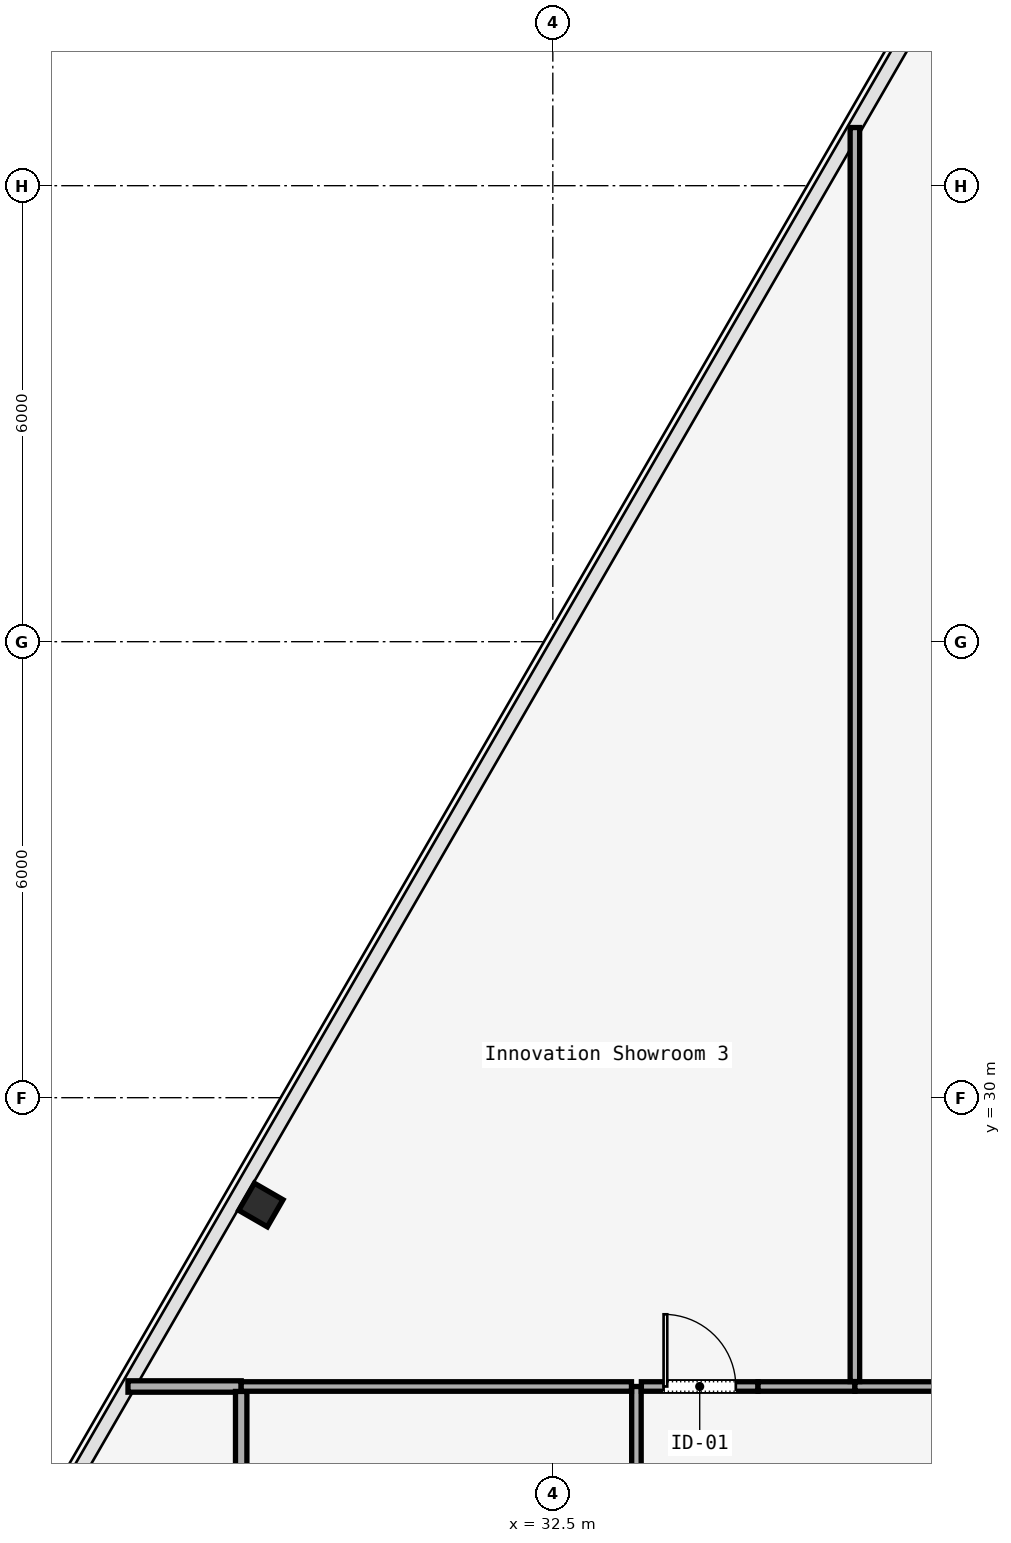
"""IFC4 building model, lengths in metres.
Left out: names, types, materials, properties, quantities, classifications, styles, units other than length and angle.
Written with IfcOpenShell. Run it as: python <this file> out.ifc"""

import sys

from ifc_helpers import new_model, si_unit, direction, frame, frame_2d, origin, origin_2d, place, context, subcontext, project, spatial, rectangle, i_section, extrude, element, fill, save


model = new_model("IFC4")
c1 = context("Model", 3, precision=1e-05, world=origin(), true_north=direction((0.0, 1.0)))
c2 = subcontext(c1, "Body", "Model", "MODEL_VIEW")
j1 = project(units=[si_unit("LENGTHUNIT", "METRE"), si_unit("PLANEANGLEUNIT", "RADIAN")], contexts=[c1])
p1 = place(None, origin())
s1 = spatial("IfcSite", under=j1, at=p1, CompositionType="ELEMENT")
p2 = place(p1, origin())
s2 = spatial("IfcBuilding", under=s1, at=p2, CompositionType="ELEMENT")
p3 = place(p2, frame((0.0, 0.0, 221.8)))
s3 = spatial("IfcBuildingStorey", under=s2, at=p3, CompositionType="ELEMENT", Elevation=221.8)
p4 = place(p3, frame((28.659, 28.588, 0.0), z_axis=(0.0, 0.0, 1.0), x_axis=(0.5, 0.866025403784, 0.0)))
e1 = element("IfcColumn", 1, at=p4, inside=s3, PredefinedType="COLUMN", context=c2, shape_type="SweptSolid", body=[
    extrude(i_section(OverallWidth=0.412, OverallDepth=0.435, WebThickness=0.036, FlangeThickness=0.044, FilletRadius=0.015, at=origin_2d()), origin(), (0.0, 0.0, 1.0), 3.58),
])
p5 = place(p3, frame((33.6, 24.465, 0.0), z_axis=(0.0, 0.0, 1.0), x_axis=(0.0, 1.0, 0.0)))
e2 = element("IfcWall", 2, at=p5, inside=s3, PredefinedType="PARTITIONING", context=c2, shape_type="SweptSolid", body=[
    extrude(rectangle(XDim=1.735, YDim=0.125, at=frame_2d((0.867, 0.0))), origin(), (0.0, 0.0, 1.0), 3.01),
])
p6 = place(p3, frame((33.665, 26.2, 0.0), z_axis=(0.0, 0.0, 1.0), x_axis=(1.0, 0.0, 0.0)))
e3 = element("IfcWall", 3, at=p6, inside=s3, PredefinedType="PARTITIONING", context=c2, shape_type="SweptSolid", body=[
    extrude(rectangle(XDim=1.535, YDim=0.125, at=frame_2d((0.768, 0.0))), origin(), (0.0, 0.0, 1.0), 3.01),
])
p7 = place(p6, frame((0.292, 0.0, 0.0)))
e4 = element("IfcOpeningElement", 4, at=p7, cuts=e3, PredefinedType="OPENING", context=c2, shape_type="SweptSolid", body=[
    extrude(rectangle(XDim=0.95, YDim=2.2, at=frame_2d((0.475, 1.1))), frame((0.0, 0.062, 0.0), z_axis=(0.0, -1.0, 0.0), x_axis=(1.0, 0.0, 0.0)), (0.0, 0.0, 1.0), 0.125),
])
p8 = place(p3, frame((35.2, 26.2, 0.0), z_axis=(0.0, 0.0, 1.0), x_axis=(1.0, 0.0, 0.0)))
e5 = element("IfcWall", 5, at=p8, inside=s3, PredefinedType="PARTITIONING", context=c2, shape_type="SweptSolid", body=[
    extrude(rectangle(XDim=1.274, YDim=0.125, at=frame_2d((0.637, 0.0))), origin(), (0.0, 0.0, 1.0), 3.01),
])
p9 = place(p3, frame((36.474, 26.2, 0.0), z_axis=(0.0, 0.0, 1.0), x_axis=(1.0, 0.0, 0.0)))
e6 = element("IfcWall", 6, at=p9, inside=s3, PredefinedType="PARTITIONING", context=c2, shape_type="SweptSolid", body=[
    extrude(rectangle(XDim=4.676, YDim=0.125, at=frame_2d((2.338, 0.0))), origin(), (0.0, 0.0, 1.0), 3.01),
])
p10 = place(p9, frame((1.863, 0.0, 0.0)))
e7 = element("IfcOpeningElement", 7, at=p10, cuts=e6, PredefinedType="OPENING", context=c2, shape_type="SweptSolid", body=[
    extrude(rectangle(XDim=0.95, YDim=2.2, at=frame_2d((0.475, 1.1))), frame((0.0, 0.062, 0.0), z_axis=(0.0, -1.0, 0.0), x_axis=(1.0, 0.0, 0.0)), (0.0, 0.0, 1.0), 0.125),
])
p11 = place(p3, frame((26.91, 26.2, 0.0), z_axis=(0.0, 0.0, 1.0), x_axis=(1.0, 0.0, 0.0)))
e8 = element("IfcWall", 8, at=p11, inside=s3, PredefinedType="PARTITIONING", context=c2, shape_type="SweptSolid", body=[
    extrude(rectangle(XDim=1.49, YDim=0.15, at=frame_2d((0.745, 0.0))), origin(), (0.0, 0.0, 1.0), 3.01),
])
p12 = place(p3, frame((28.4, 26.135, 0.0), z_axis=(0.0, 0.0, 1.0), x_axis=(0.0, -1.0, 0.0)))
e9 = element("IfcWall", 9, at=p12, inside=s3, PredefinedType="PARTITIONING", context=c2, shape_type="SweptSolid", body=[
    extrude(rectangle(XDim=9.07, YDim=0.15, at=frame_2d((4.535, 0.0))), origin(), (0.0, 0.0, 1.0), 3.01),
])
p13 = place(p3, frame((28.4, 26.2, 0.0), z_axis=(0.0, 0.0, 1.0), x_axis=(1.0, 0.0, 0.0)))
e10 = element("IfcWall", 10, at=p13, inside=s3, PredefinedType="PARTITIONING", context=c2, shape_type="SweptSolid", body=[
    extrude(rectangle(XDim=5.135, YDim=0.125, at=frame_2d((2.567, 0.0))), origin(), (0.0, 0.0, 1.0), 3.01),
])
p14 = place(p3, frame((36.474, 42.765, 0.0), z_axis=(0.0, 0.0, 1.0), x_axis=(0.0, -1.0, 0.0)))
e11 = element("IfcWall", 11, at=p14, inside=s3, PredefinedType="PARTITIONING", context=c2, shape_type="SweptSolid", body=[
    extrude(rectangle(XDim=16.5, YDim=0.125, at=frame_2d((8.25, 0.0))), origin(), (0.0, 0.0, 1.0), 3.01),
])
p15 = place(p7, origin())
e12 = element("IfcDoor", 12, at=p15, inside=s3, OperationType="SINGLE_SWING_LEFT", PredefinedType="DOOR", context=c2, shape_type="SweptSolid", body=[
    extrude(rectangle(XDim=0.95, YDim=2.2, at=frame_2d((0.475, 1.1))), frame((0.0, 0.025, 0.0), z_axis=(0.0, -1.0, 0.0), x_axis=(1.0, 0.0, 0.0)), (0.0, 0.0, 1.0), 0.05),
])
fill(e4, e12)
save(model, sys.argv[1])
